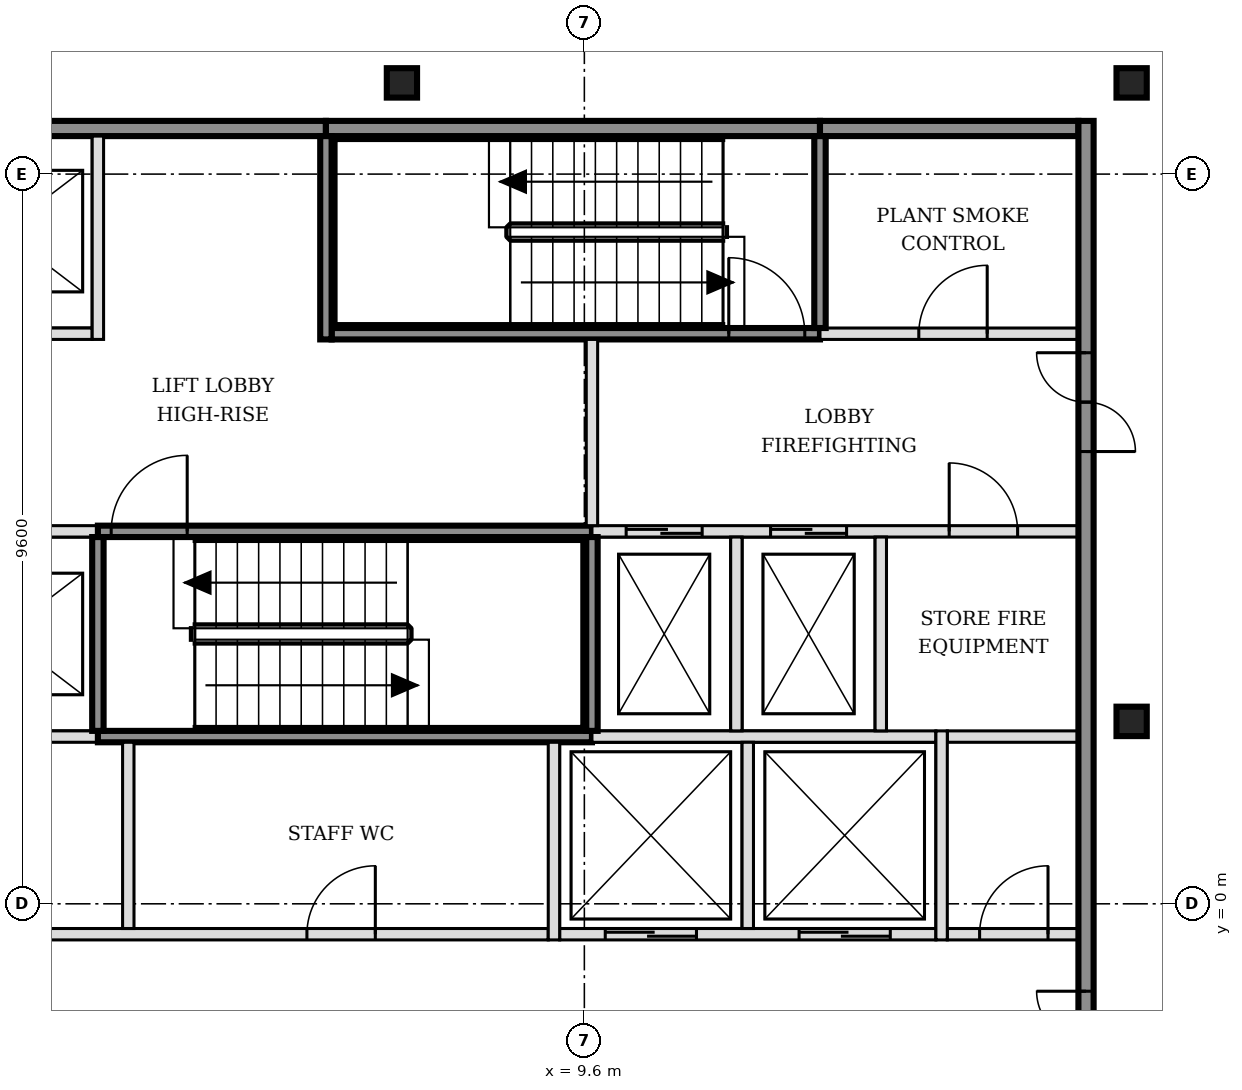
"""IFC4 building model, lengths in metres.
Left out: names, types, materials, properties, quantities, classifications, styles, units other than length and angle.
Written with IfcOpenShell. Run it as: python <this file> out.ifc"""

import sys

from ifc_helpers import new_model, si_unit, direction, frame, frame_2d, origin, origin_2d, place, context, subcontext, project, spatial, rectangle, i_section, extrude, element, fill, save


model = new_model("IFC4")
c1 = context("Model", 3, precision=1e-05, world=origin(), true_north=direction((0.0, 1.0)))
c2 = subcontext(c1, "Body", "Model", "MODEL_VIEW")
j1 = project(units=[si_unit("LENGTHUNIT", "METRE"), si_unit("PLANEANGLEUNIT", "RADIAN")], contexts=[c1])
p1 = place(None, origin())
s1 = spatial("IfcSite", under=j1, at=p1, CompositionType="ELEMENT")
p2 = place(p1, origin())
s2 = spatial("IfcBuilding", under=s1, at=p2, CompositionType="ELEMENT")
p3 = place(p2, frame((0.0, 0.0, 253.8)))
s3 = spatial("IfcBuildingStorey", under=s2, at=p3, CompositionType="ELEMENT", Elevation=253.8)
for number, where, z_axis, x_axis in (
    (1, (16.8, 2.4, -0.15), (0.0, 0.0, 1.0), (1.0, 0.0, 0.0)),
    (2, (7.2, 10.8, -0.15), (0.0, 0.0, 1.0), (1.0, 0.0, 0.0)),
    (3, (16.8, 10.8, -0.15), (0.0, 0.0, 1.0), (1.0, 0.0, 0.0)),
):
    element("IfcColumn", number, at=place(p3, frame(where, z_axis=z_axis, x_axis=x_axis)), inside=s3, PredefinedType="COLUMN", context=c2, shape_type="SweptSolid", body=[
        extrude(i_section(OverallWidth=0.398, OverallDepth=0.387, WebThickness=0.021, FlangeThickness=0.033, FilletRadius=0.015, at=origin_2d()), origin(), (0.0, 0.0, 1.0), 3.6),
    ])
p4 = place(p3, frame((-1.7, -0.4, 0.0), z_axis=(0.0, 0.0, 1.0), x_axis=(1.0, 0.0, 0.0)))
e4 = element("IfcWall", 4, at=p4, inside=s3, PredefinedType="PARTITIONING", context=c2, shape_type="SweptSolid", body=[
    extrude(rectangle(XDim=10.825, YDim=0.15, at=frame_2d((5.413, 0.0))), origin(), (0.0, 0.0, 1.0), 3.45),
])
p5 = place(p4, frame((2.15, 0.0, 0.0)))
e5 = element("IfcOpeningElement", 5, at=p5, cuts=e4, PredefinedType="OPENING", context=c2, shape_type="SweptSolid", body=[
    extrude(rectangle(XDim=0.9, YDim=2.1, at=frame_2d((0.45, 1.05))), frame((0.0, 0.085, 0.0), z_axis=(0.0, -1.0, 0.0), x_axis=(1.0, 0.0, 0.0)), (0.0, 0.0, 1.0), 0.17),
])
p6 = place(p4, frame((7.65, 0.0, 0.0)))
e6 = element("IfcOpeningElement", 6, at=p6, cuts=e4, PredefinedType="OPENING", context=c2, shape_type="SweptSolid", body=[
    extrude(rectangle(XDim=0.9, YDim=2.1, at=frame_2d((0.45, 1.05))), frame((0.0, 0.085, 0.0), z_axis=(0.0, -1.0, 0.0), x_axis=(1.0, 0.0, 0.0)), (0.0, 0.0, 1.0), 0.17),
])
p7 = place(p3, frame((9.275, -0.4, 0.0), z_axis=(0.0, 0.0, 1.0), x_axis=(1.0, 0.0, 0.0)))
e7 = element("IfcWall", 7, at=p7, inside=s3, PredefinedType="SOLIDWALL", context=c2, shape_type="SweptSolid", body=[
    extrude(rectangle(XDim=4.95, YDim=0.15, at=frame_2d((2.475, 0.0))), origin(), (0.0, 0.0, 1.0), 3.45),
])
p8 = place(p7, frame((0.6, 0.0, 0.0)))
e8 = element("IfcOpeningElement", 8, at=p8, cuts=e7, PredefinedType="OPENING", context=c2, shape_type="SweptSolid", body=[
    extrude(rectangle(XDim=1.2, YDim=2.1, at=frame_2d((0.6, 1.05))), frame((0.0, 0.085, 0.0), z_axis=(0.0, -1.0, 0.0), x_axis=(1.0, 0.0, 0.0)), (0.0, 0.0, 1.0), 0.17),
])
p9 = place(p7, frame((3.15, 0.0, 0.0)))
e9 = element("IfcOpeningElement", 9, at=p9, cuts=e7, PredefinedType="OPENING", context=c2, shape_type="SweptSolid", body=[
    extrude(rectangle(XDim=1.2, YDim=2.1, at=frame_2d((0.6, 1.05))), frame((0.0, 0.085, 0.0), z_axis=(0.0, -1.0, 0.0), x_axis=(1.0, 0.0, 0.0)), (0.0, 0.0, 1.0), 0.17),
])
p10 = place(p3, frame((14.375, -0.4, 0.0), z_axis=(0.0, 0.0, 1.0), x_axis=(1.0, 0.0, 0.0)))
e10 = element("IfcWall", 10, at=p10, inside=s3, PredefinedType="PARTITIONING", context=c2, shape_type="SweptSolid", body=[
    extrude(rectangle(XDim=1.725, YDim=0.15, at=frame_2d((0.863, 0.0))), origin(), (0.0, 0.0, 1.0), 3.45),
])
p11 = place(p10, frame((0.425, 0.0, 0.0)))
e11 = element("IfcOpeningElement", 11, at=p11, cuts=e10, PredefinedType="OPENING", context=c2, shape_type="SweptSolid", body=[
    extrude(rectangle(XDim=0.9, YDim=2.1, at=frame_2d((0.45, 1.05))), frame((0.0, 0.085, 0.0), z_axis=(0.0, -1.0, 0.0), x_axis=(1.0, 0.0, 0.0)), (0.0, 0.0, 1.0), 0.17),
])
p12 = place(p3, frame((-1.7, 2.2, 0.0), z_axis=(0.0, 0.0, 1.0), x_axis=(1.0, 0.0, 0.0)))
e12 = element("IfcWall", 12, at=p12, inside=s3, PredefinedType="SOLIDWALL", context=c2, shape_type="SweptSolid", body=[
    extrude(rectangle(XDim=4.9, YDim=0.15, at=frame_2d((2.45, 0.0))), origin(), (0.0, 0.0, 1.0), 3.45),
])
p13 = place(p3, frame((3.2, 2.2, 0.0), z_axis=(0.0, 0.0, 1.0), x_axis=(1.0, 0.0, 0.0)))
e13 = element("IfcWall", 13, at=p13, inside=s3, PredefinedType="SOLIDWALL", context=c2, shape_type="SweptSolid", body=[
    extrude(rectangle(XDim=6.5, YDim=0.15, at=frame_2d((3.25, 0.0))), origin(), (0.0, 0.0, 1.0), 3.45),
])
p14 = place(p3, frame((9.7, 2.2, 0.0), z_axis=(0.0, 0.0, 1.0), x_axis=(1.0, 0.0, 0.0)))
e14 = element("IfcWall", 14, at=p14, inside=s3, PredefinedType="SOLIDWALL", context=c2, shape_type="SweptSolid", body=[
    extrude(rectangle(XDim=4.525, YDim=0.15, at=frame_2d((2.263, 0.0))), origin(), (0.0, 0.0, 1.0), 3.45),
])
p15 = place(p3, frame((14.375, 2.2, 0.0), z_axis=(0.0, 0.0, 1.0), x_axis=(1.0, 0.0, 0.0)))
e15 = element("IfcWall", 15, at=p15, inside=s3, PredefinedType="PARTITIONING", context=c2, shape_type="SweptSolid", body=[
    extrude(rectangle(XDim=1.725, YDim=0.15, at=frame_2d((0.863, 0.0))), origin(), (0.0, 0.0, 1.0), 3.45),
])
p16 = place(p3, frame((-1.7, 4.9, 0.0), z_axis=(0.0, 0.0, 1.0), x_axis=(1.0, 0.0, 0.0)))
e16 = element("IfcWall", 16, at=p16, inside=s3, PredefinedType="SOLIDWALL", context=c2, shape_type="SweptSolid", body=[
    extrude(rectangle(XDim=4.9, YDim=0.15, at=frame_2d((2.45, 0.0))), origin(), (0.0, 0.0, 1.0), 3.45),
])
p17 = place(p16, frame((0.6, 0.0, 0.0)))
e17 = element("IfcOpeningElement", 17, at=p17, cuts=e16, PredefinedType="OPENING", context=c2, shape_type="SweptSolid", body=[
    extrude(rectangle(XDim=1.1, YDim=2.1, at=frame_2d((0.55, 1.05))), frame((0.0, 0.085, 0.0), z_axis=(0.0, -1.0, 0.0), x_axis=(1.0, 0.0, 0.0)), (0.0, 0.0, 1.0), 0.17),
])
p18 = place(p16, frame((3.1, 0.0, 0.0)))
e18 = element("IfcOpeningElement", 18, at=p18, cuts=e16, PredefinedType="OPENING", context=c2, shape_type="SweptSolid", body=[
    extrude(rectangle(XDim=1.1, YDim=2.1, at=frame_2d((0.55, 1.05))), frame((0.0, 0.085, 0.0), z_axis=(0.0, -1.0, 0.0), x_axis=(1.0, 0.0, 0.0)), (0.0, 0.0, 1.0), 0.17),
])
p19 = place(p3, frame((3.2, 4.9, 0.0), z_axis=(0.0, 0.0, 1.0), x_axis=(1.0, 0.0, 0.0)))
e19 = element("IfcWall", 19, at=p19, inside=s3, PredefinedType="SOLIDWALL", context=c2, shape_type="SweptSolid", body=[
    extrude(rectangle(XDim=6.5, YDim=0.15, at=frame_2d((3.25, 0.0))), origin(), (0.0, 0.0, 1.0), 3.45),
])
p20 = place(p19, frame((0.175, 0.0, 0.0)))
e20 = element("IfcOpeningElement", 20, at=p20, cuts=e19, PredefinedType="OPENING", context=c2, shape_type="SweptSolid", body=[
    extrude(rectangle(XDim=1.0, YDim=2.1, at=frame_2d((0.5, 1.05))), frame((0.0, 0.085, 0.0), z_axis=(0.0, -1.0, 0.0), x_axis=(1.0, 0.0, 0.0)), (0.0, 0.0, 1.0), 0.17),
])
p21 = place(p3, frame((9.7, 4.9, 0.0), z_axis=(0.0, 0.0, 1.0), x_axis=(1.0, 0.0, 0.0)))
e21 = element("IfcWall", 21, at=p21, inside=s3, PredefinedType="SOLIDWALL", context=c2, shape_type="SweptSolid", body=[
    extrude(rectangle(XDim=6.4, YDim=0.15, at=frame_2d((3.2, 0.0))), origin(), (0.0, 0.0, 1.0), 3.45),
])
p22 = place(p21, frame((0.45, 0.0, 0.0)))
e22 = element("IfcOpeningElement", 22, at=p22, cuts=e21, PredefinedType="OPENING", context=c2, shape_type="SweptSolid", body=[
    extrude(rectangle(XDim=1.0, YDim=2.1, at=frame_2d((0.5, 1.05))), frame((0.0, 0.085, 0.0), z_axis=(0.0, -1.0, 0.0), x_axis=(1.0, 0.0, 0.0)), (0.0, 0.0, 1.0), 0.17),
])
p23 = place(p21, frame((2.35, 0.0, 0.0)))
e23 = element("IfcOpeningElement", 23, at=p23, cuts=e21, PredefinedType="OPENING", context=c2, shape_type="SweptSolid", body=[
    extrude(rectangle(XDim=1.0, YDim=2.1, at=frame_2d((0.5, 1.05))), frame((0.0, 0.085, 0.0), z_axis=(0.0, -1.0, 0.0), x_axis=(1.0, 0.0, 0.0)), (0.0, 0.0, 1.0), 0.17),
])
p24 = place(p21, frame((4.7, 0.0, 0.0)))
e24 = element("IfcOpeningElement", 24, at=p24, cuts=e21, PredefinedType="OPENING", context=c2, shape_type="SweptSolid", body=[
    extrude(rectangle(XDim=0.9, YDim=2.1, at=frame_2d((0.45, 1.05))), frame((0.0, 0.085, 0.0), z_axis=(0.0, -1.0, 0.0), x_axis=(1.0, 0.0, 0.0)), (0.0, 0.0, 1.0), 0.17),
])
p25 = place(p3, frame((-1.7, 7.5, 0.0), z_axis=(0.0, 0.0, 1.0), x_axis=(1.0, 0.0, 0.0)))
e25 = element("IfcWall", 25, at=p25, inside=s3, PredefinedType="SOLIDWALL", context=c2, shape_type="SweptSolid", body=[
    extrude(rectangle(XDim=4.825, YDim=0.15, at=frame_2d((2.413, 0.0))), origin(), (0.0, 0.0, 1.0), 3.45),
])
p26 = place(p25, frame((0.6, 0.0, 0.0)))
e26 = element("IfcOpeningElement", 26, at=p26, cuts=e25, PredefinedType="OPENING", context=c2, shape_type="SweptSolid", body=[
    extrude(rectangle(XDim=1.1, YDim=2.1, at=frame_2d((0.55, 1.05))), frame((0.0, 0.085, 0.0), z_axis=(0.0, -1.0, 0.0), x_axis=(1.0, 0.0, 0.0)), (0.0, 0.0, 1.0), 0.17),
])
p27 = place(p25, frame((3.1, 0.0, 0.0)))
e27 = element("IfcOpeningElement", 27, at=p27, cuts=e25, PredefinedType="OPENING", context=c2, shape_type="SweptSolid", body=[
    extrude(rectangle(XDim=1.1, YDim=2.1, at=frame_2d((0.55, 1.05))), frame((0.0, 0.085, 0.0), z_axis=(0.0, -1.0, 0.0), x_axis=(1.0, 0.0, 0.0)), (0.0, 0.0, 1.0), 0.17),
])
p28 = place(p3, frame((6.275, 7.5, 0.0), z_axis=(0.0, 0.0, 1.0), x_axis=(1.0, 0.0, 0.0)))
e28 = element("IfcWall", 28, at=p28, inside=s3, PredefinedType="SOLIDWALL", context=c2, shape_type="SweptSolid", body=[
    extrude(rectangle(XDim=6.425, YDim=0.15, at=frame_2d((3.212, 0.0))), origin(), (0.0, 0.0, 1.0), 3.45),
])
p29 = place(p28, frame((5.225, 0.0, 0.0)))
e29 = element("IfcOpeningElement", 29, at=p29, cuts=e28, PredefinedType="OPENING", context=c2, shape_type="SweptSolid", body=[
    extrude(rectangle(XDim=1.0, YDim=2.1, at=frame_2d((0.5, 1.05))), frame((0.0, 0.085, 0.0), z_axis=(0.0, -1.0, 0.0), x_axis=(1.0, 0.0, 0.0)), (0.0, 0.0, 1.0), 0.17),
])
p30 = place(p3, frame((12.7, 7.5, 0.0), z_axis=(0.0, 0.0, 1.0), x_axis=(1.0, 0.0, 0.0)))
e30 = element("IfcWall", 30, at=p30, inside=s3, PredefinedType="SOLIDWALL", context=c2, shape_type="SweptSolid", body=[
    extrude(rectangle(XDim=3.4, YDim=0.15, at=frame_2d((1.7, 0.0))), origin(), (0.0, 0.0, 1.0), 3.45),
])
p31 = place(p30, frame((1.3, 0.0, 0.0)))
e31 = element("IfcOpeningElement", 31, at=p31, cuts=e30, PredefinedType="OPENING", context=c2, shape_type="SweptSolid", body=[
    extrude(rectangle(XDim=0.9, YDim=2.1, at=frame_2d((0.45, 1.05))), frame((0.0, 0.085, 0.0), z_axis=(0.0, -1.0, 0.0), x_axis=(1.0, 0.0, 0.0)), (0.0, 0.0, 1.0), 0.17),
])
p32 = place(p3, frame((-1.7, 10.2, 0.0), z_axis=(0.0, 0.0, 1.0), x_axis=(1.0, 0.0, 0.0)))
e32 = element("IfcWall", 32, at=p32, inside=s3, PredefinedType="SOLIDWALL", context=c2, shape_type="SweptSolid", body=[
    extrude(rectangle(XDim=7.9, YDim=0.2, at=frame_2d((3.95, 0.0))), origin(), (0.0, 0.0, 1.0), 3.45),
])
p33 = place(p3, frame((6.2, 10.2, 0.0), z_axis=(0.0, 0.0, 1.0), x_axis=(1.0, 0.0, 0.0)))
e33 = element("IfcWall", 33, at=p33, inside=s3, PredefinedType="SOLIDWALL", context=c2, shape_type="SweptSolid", body=[
    extrude(rectangle(XDim=6.5, YDim=0.2, at=frame_2d((3.25, 0.0))), origin(), (0.0, 0.0, 1.0), 3.45),
])
p34 = place(p3, frame((12.7, 10.2, 0.0), z_axis=(0.0, 0.0, 1.0), x_axis=(1.0, 0.0, 0.0)))
e34 = element("IfcWall", 34, at=p34, inside=s3, PredefinedType="SOLIDWALL", context=c2, shape_type="SweptSolid", body=[
    extrude(rectangle(XDim=3.4, YDim=0.2, at=frame_2d((1.7, 0.0))), origin(), (0.0, 0.0, 1.0), 3.45),
])
p35 = place(p3, frame((3.2, 2.275, 0.0), z_axis=(0.0, 0.0, 1.0), x_axis=(0.0, 1.0, 0.0)))
e35 = element("IfcWall", 35, at=p35, inside=s3, PredefinedType="SOLIDWALL", context=c2, shape_type="SweptSolid", body=[
    extrude(rectangle(XDim=2.55, YDim=0.15, at=frame_2d((1.275, 0.0))), origin(), (0.0, 0.0, 1.0), 3.45),
])
p36 = place(p3, frame((3.2, 7.425, 0.0), z_axis=(0.0, 0.0, 1.0), x_axis=(0.0, 1.0, 0.0)))
e36 = element("IfcWall", 36, at=p36, inside=s3, PredefinedType="SOLIDWALL", context=c2, shape_type="SweptSolid", body=[
    extrude(rectangle(XDim=2.675, YDim=0.15, at=frame_2d((1.337, 0.0))), origin(), (0.0, 0.0, 1.0), 3.45),
])
p37 = place(p3, frame((3.6, -0.325, 0.0), z_axis=(0.0, 0.0, 1.0), x_axis=(0.0, 1.0, 0.0)))
e37 = element("IfcWall", 37, at=p37, inside=s3, PredefinedType="PARTITIONING", context=c2, shape_type="SweptSolid", body=[
    extrude(rectangle(XDim=2.45, YDim=0.15, at=frame_2d((1.225, 0.0))), origin(), (0.0, 0.0, 1.0), 3.45),
])
p38 = place(p3, frame((6.2, 7.425, 0.0), z_axis=(0.0, 0.0, 1.0), x_axis=(0.0, 1.0, 0.0)))
e38 = element("IfcWall", 38, at=p38, inside=s3, PredefinedType="SOLIDWALL", context=c2, shape_type="SweptSolid", body=[
    extrude(rectangle(XDim=2.675, YDim=0.15, at=frame_2d((1.337, 0.0))), origin(), (0.0, 0.0, 1.0), 3.45),
])
p39 = place(p3, frame((9.2, -0.475, 0.0), z_axis=(0.0, 0.0, 1.0), x_axis=(0.0, 1.0, 0.0)))
e39 = element("IfcWall", 39, at=p39, inside=s3, PredefinedType="SOLIDWALL", context=c2, shape_type="SweptSolid", body=[
    extrude(rectangle(XDim=2.6, YDim=0.15, at=frame_2d((1.3, 0.0))), origin(), (0.0, 0.0, 1.0), 3.45),
])
p40 = place(p3, frame((9.7, 2.275, 0.0), z_axis=(0.0, 0.0, 1.0), x_axis=(0.0, 1.0, 0.0)))
e40 = element("IfcWall", 40, at=p40, inside=s3, PredefinedType="SOLIDWALL", context=c2, shape_type="SweptSolid", body=[
    extrude(rectangle(XDim=2.55, YDim=0.15, at=frame_2d((1.275, 0.0))), origin(), (0.0, 0.0, 1.0), 3.45),
])
p41 = place(p3, frame((9.7, 4.975, 0.0), z_axis=(0.0, 0.0, 1.0), x_axis=(0.0, 1.0, 0.0)))
e41 = element("IfcWall", 41, at=p41, inside=s3, PredefinedType="SOLIDWALL", context=c2, shape_type="SweptSolid", body=[
    extrude(rectangle(XDim=2.45, YDim=0.15, at=frame_2d((1.225, 0.0))), origin(), (0.0, 0.0, 1.0), 3.45),
])
p42 = place(p3, frame((11.6, 2.275, 0.0), z_axis=(0.0, 0.0, 1.0), x_axis=(0.0, 1.0, 0.0)))
e42 = element("IfcWall", 42, at=p42, inside=s3, PredefinedType="SOLIDWALL", context=c2, shape_type="SweptSolid", body=[
    extrude(rectangle(XDim=2.55, YDim=0.15, at=frame_2d((1.275, 0.0))), origin(), (0.0, 0.0, 1.0), 3.45),
])
p43 = place(p3, frame((11.75, -0.325, 0.0), z_axis=(0.0, 0.0, 1.0), x_axis=(0.0, 1.0, 0.0)))
e43 = element("IfcWall", 43, at=p43, inside=s3, PredefinedType="SOLIDWALL", context=c2, shape_type="SweptSolid", body=[
    extrude(rectangle(XDim=2.45, YDim=0.15, at=frame_2d((1.225, 0.0))), origin(), (0.0, 0.0, 1.0), 3.45),
])
p44 = place(p3, frame((12.7, 7.575, 0.0), z_axis=(0.0, 0.0, 1.0), x_axis=(0.0, 1.0, 0.0)))
e44 = element("IfcWall", 44, at=p44, inside=s3, PredefinedType="SOLIDWALL", context=c2, shape_type="SweptSolid", body=[
    extrude(rectangle(XDim=2.525, YDim=0.15, at=frame_2d((1.263, 0.0))), origin(), (0.0, 0.0, 1.0), 3.45),
])
p45 = place(p3, frame((13.5, 2.275, 0.0), z_axis=(0.0, 0.0, 1.0), x_axis=(0.0, 1.0, 0.0)))
e45 = element("IfcWall", 45, at=p45, inside=s3, PredefinedType="SOLIDWALL", context=c2, shape_type="SweptSolid", body=[
    extrude(rectangle(XDim=2.55, YDim=0.15, at=frame_2d((1.275, 0.0))), origin(), (0.0, 0.0, 1.0), 3.45),
])
p46 = place(p3, frame((14.3, -0.475, 0.0), z_axis=(0.0, 0.0, 1.0), x_axis=(0.0, 1.0, 0.0)))
e46 = element("IfcWall", 46, at=p46, inside=s3, PredefinedType="SOLIDWALL", context=c2, shape_type="SweptSolid", body=[
    extrude(rectangle(XDim=2.75, YDim=0.15, at=frame_2d((1.375, 0.0))), origin(), (0.0, 0.0, 1.0), 3.45),
])
p47 = place(p3, frame((16.2, -5.5, 0.0), z_axis=(0.0, 0.0, 1.0), x_axis=(0.0, 1.0, 0.0)))
e47 = element("IfcWall", 47, at=p47, inside=s3, PredefinedType="SOLIDWALL", context=c2, shape_type="SweptSolid", body=[
    extrude(rectangle(XDim=15.8, YDim=0.2, at=frame_2d((7.9, 0.0))), origin(), (0.0, 0.0, 1.0), 3.45),
])
p48 = place(p47, frame((3.05, 0.0, 0.0)))
e48 = element("IfcOpeningElement", 48, at=p48, cuts=e47, PredefinedType="OPENING", context=c2, shape_type="SweptSolid", body=[
    extrude(rectangle(XDim=1.3, YDim=2.1, at=frame_2d((0.65, 1.05))), frame((0.0, 0.11, 0.0), z_axis=(0.0, -1.0, 0.0), x_axis=(1.0, 0.0, 0.0)), (0.0, 0.0, 1.0), 0.22),
])
p49 = place(p47, frame((11.45, 0.0, 0.0)))
e49 = element("IfcOpeningElement", 49, at=p49, cuts=e47, PredefinedType="OPENING", context=c2, shape_type="SweptSolid", body=[
    extrude(rectangle(XDim=1.3, YDim=2.1, at=frame_2d((0.65, 1.05))), frame((0.0, 0.11, 0.0), z_axis=(0.0, -1.0, 0.0), x_axis=(1.0, 0.0, 0.0)), (0.0, 0.0, 1.0), 0.22),
])
p50 = place(p8, origin())
e50 = element("IfcDoor", 50, at=p50, inside=s3, OperationType="DOUBLE_DOOR_SLIDING", PredefinedType="DOOR", context=c2, shape_type="SweptSolid", body=[
    extrude(rectangle(XDim=1.2, YDim=2.1, at=frame_2d((0.6, 1.05))), frame((0.0, 0.025, 0.0), z_axis=(0.0, -1.0, 0.0), x_axis=(1.0, 0.0, 0.0)), (0.0, 0.0, 1.0), 0.05),
])
fill(e8, e50)
p51 = place(p9, origin())
e51 = element("IfcDoor", 51, at=p51, inside=s3, OperationType="DOUBLE_DOOR_SLIDING", PredefinedType="DOOR", context=c2, shape_type="SweptSolid", body=[
    extrude(rectangle(XDim=1.2, YDim=2.1, at=frame_2d((0.6, 1.05))), frame((0.0, 0.025, 0.0), z_axis=(0.0, -1.0, 0.0), x_axis=(1.0, 0.0, 0.0)), (0.0, 0.0, 1.0), 0.05),
])
fill(e9, e51)
p52 = place(p22, origin())
e52 = element("IfcDoor", 52, at=p52, inside=s3, OperationType="DOUBLE_DOOR_SLIDING", PredefinedType="DOOR", context=c2, shape_type="SweptSolid", body=[
    extrude(rectangle(XDim=1.0, YDim=2.1, at=frame_2d((0.5, 1.05))), frame((0.0, 0.025, 0.0), z_axis=(0.0, -1.0, 0.0), x_axis=(1.0, 0.0, 0.0)), (0.0, 0.0, 1.0), 0.05),
])
fill(e22, e52)
p53 = place(p23, origin())
e53 = element("IfcDoor", 53, at=p53, inside=s3, OperationType="DOUBLE_DOOR_SLIDING", PredefinedType="DOOR", context=c2, shape_type="SweptSolid", body=[
    extrude(rectangle(XDim=1.0, YDim=2.1, at=frame_2d((0.5, 1.05))), frame((0.0, 0.025, 0.0), z_axis=(0.0, -1.0, 0.0), x_axis=(1.0, 0.0, 0.0)), (0.0, 0.0, 1.0), 0.05),
])
fill(e23, e53)
p54 = place(p20, origin())
e54 = element("IfcDoor", 54, at=p54, inside=s3, OperationType="SINGLE_SWING_RIGHT", PredefinedType="DOOR", context=c2, shape_type="SweptSolid", body=[
    extrude(rectangle(XDim=1.0, YDim=2.1, at=frame_2d((0.5, 1.05))), frame((0.0, 0.025, 0.0), z_axis=(0.0, -1.0, 0.0), x_axis=(1.0, 0.0, 0.0)), (0.0, 0.0, 1.0), 0.05),
])
fill(e20, e54)
p55 = place(p29, origin())
e55 = element("IfcDoor", 55, at=p55, inside=s3, OperationType="SINGLE_SWING_LEFT", PredefinedType="DOOR", context=c2, shape_type="SweptSolid", body=[
    extrude(rectangle(XDim=1.0, YDim=2.1, at=frame_2d((0.5, 1.05))), frame((0.0, 0.025, 0.0), z_axis=(0.0, -1.0, 0.0), x_axis=(1.0, 0.0, 0.0)), (0.0, 0.0, 1.0), 0.05),
])
fill(e29, e55)
p56 = place(p48, origin())
e56 = element("IfcDoor", 56, at=p56, inside=s3, OperationType="DOUBLE_DOOR_SINGLE_SWING", PredefinedType="DOOR", context=c2, shape_type="SweptSolid", body=[
    extrude(rectangle(XDim=1.3, YDim=2.1, at=frame_2d((0.65, 1.05))), frame((0.0, 0.025, 0.0), z_axis=(0.0, -1.0, 0.0), x_axis=(1.0, 0.0, 0.0)), (0.0, 0.0, 1.0), 0.05),
])
fill(e48, e56)
p57 = place(p49, origin())
e57 = element("IfcDoor", 57, at=p57, inside=s3, OperationType="DOUBLE_DOOR_SINGLE_SWING", PredefinedType="DOOR", context=c2, shape_type="SweptSolid", body=[
    extrude(rectangle(XDim=1.3, YDim=2.1, at=frame_2d((0.65, 1.05))), frame((0.0, 0.025, 0.0), z_axis=(0.0, -1.0, 0.0), x_axis=(1.0, 0.0, 0.0)), (0.0, 0.0, 1.0), 0.05),
])
fill(e49, e57)
p58 = place(p11, origin())
e58 = element("IfcDoor", 58, at=p58, inside=s3, OperationType="SINGLE_SWING_RIGHT", PredefinedType="DOOR", context=c2, shape_type="SweptSolid", body=[
    extrude(rectangle(XDim=0.9, YDim=2.1, at=frame_2d((0.45, 1.05))), frame((0.0, 0.025, 0.0), z_axis=(0.0, -1.0, 0.0), x_axis=(1.0, 0.0, 0.0)), (0.0, 0.0, 1.0), 0.05),
])
fill(e11, e58)
p59 = place(p24, origin())
e59 = element("IfcDoor", 59, at=p59, inside=s3, OperationType="SINGLE_SWING_LEFT", PredefinedType="DOOR", context=c2, shape_type="SweptSolid", body=[
    extrude(rectangle(XDim=0.9, YDim=2.1, at=frame_2d((0.45, 1.05))), frame((0.0, 0.025, 0.0), z_axis=(0.0, -1.0, 0.0), x_axis=(1.0, 0.0, 0.0)), (0.0, 0.0, 1.0), 0.05),
])
fill(e24, e59)
p60 = place(p31, origin())
e60 = element("IfcDoor", 60, at=p60, inside=s3, OperationType="SINGLE_SWING_RIGHT", PredefinedType="DOOR", context=c2, shape_type="SweptSolid", body=[
    extrude(rectangle(XDim=0.9, YDim=2.1, at=frame_2d((0.45, 1.05))), frame((0.0, 0.025, 0.0), z_axis=(0.0, -1.0, 0.0), x_axis=(1.0, 0.0, 0.0)), (0.0, 0.0, 1.0), 0.05),
])
fill(e31, e60)
p61 = place(p6, origin())
e61 = element("IfcDoor", 61, at=p61, inside=s3, OperationType="SINGLE_SWING_RIGHT", PredefinedType="DOOR", context=c2, shape_type="SweptSolid", body=[
    extrude(rectangle(XDim=0.9, YDim=2.1, at=frame_2d((0.45, 1.05))), frame((0.0, 0.025, 0.0), z_axis=(0.0, -1.0, 0.0), x_axis=(1.0, 0.0, 0.0)), (0.0, 0.0, 1.0), 0.05),
])
fill(e6, e61)
save(model, sys.argv[1])
